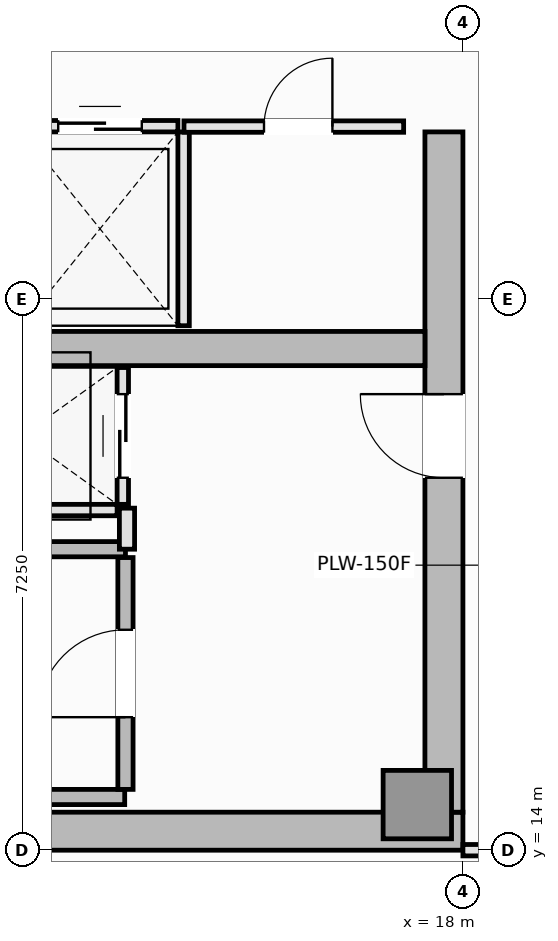
"""IFC4 building model, lengths in metres.
Left out: names, types, materials, properties, quantities, classifications, styles, units other than length and angle.
Written with IfcOpenShell. Run it as: python <this file> out.ifc"""

import sys

from ifc_helpers import new_model, si_unit, direction, frame, frame_2d, origin, origin_2d, place, context, subcontext, project, spatial, rectangle, extrude, element, fill, save


model = new_model("IFC4")
c1 = context("Model", 3, precision=1e-05, world=origin(), true_north=direction((0.0, 1.0)))
c2 = subcontext(c1, "Body", "Model", "MODEL_VIEW")
j1 = project(units=[si_unit("LENGTHUNIT", "METRE"), si_unit("PLANEANGLEUNIT", "RADIAN")], contexts=[c1])
p1 = place(None, origin())
s1 = spatial("IfcSite", under=j1, at=p1, CompositionType="ELEMENT")
p2 = place(p1, origin())
s2 = spatial("IfcBuilding", under=s1, at=p2, CompositionType="ELEMENT")
p3 = place(p2, frame((0.0, 0.0, 281.2)))
s3 = spatial("IfcBuildingStorey", under=s2, at=p3, CompositionType="ELEMENT", Elevation=281.2)
p4 = place(p3, frame((4.5, 14.25, 0.0), z_axis=(0.0, 0.0, 1.0), x_axis=(1.0, 0.0, 0.0)))
e1 = element("IfcWall", 1, at=p4, inside=s3, PredefinedType="SHEAR", context=c2, shape_type="SweptSolid", body=[
    extrude(rectangle(XDim=13.5, YDim=0.5, at=frame_2d((6.75, 0.0))), origin(), (0.0, 0.0, 1.0), 3.55),
])
p5 = place(p3, frame((17.75, 14.5, 0.0), z_axis=(0.0, 0.0, 1.0), x_axis=(0.0, 1.0, 0.0)))
e2 = element("IfcWall", 2, at=p5, inside=s3, PredefinedType="SHEAR", context=c2, shape_type="SweptSolid", body=[
    extrude(rectangle(XDim=8.95, YDim=0.5, at=frame_2d((4.475, 0.0))), origin(), (0.0, 0.0, 1.0), 3.55),
])
p6 = place(p5, frame((4.4, 0.0, 0.0)))
e3 = element("IfcOpeningElement", 3, at=p6, cuts=e2, PredefinedType="OPENING", context=c2, shape_type="SweptSolid", body=[
    extrude(rectangle(XDim=1.1, YDim=2.15, at=frame_2d((0.55, 1.075))), frame((0.0, 0.26, 0.0), z_axis=(0.0, -1.0, 0.0), x_axis=(1.0, 0.0, 0.0)), (0.0, 0.0, 1.0), 0.52),
])
p7 = place(p3, frame((5.0, 20.6, 0.0), z_axis=(0.0, 0.0, 1.0), x_axis=(1.0, 0.0, 0.0)))
e4 = element("IfcWall", 4, at=p7, inside=s3, PredefinedType="SHEAR", context=c2, shape_type="SweptSolid", body=[
    extrude(rectangle(XDim=12.5, YDim=0.45, at=frame_2d((6.25, 0.0))), origin(), (0.0, 0.0, 1.0), 3.55),
])
p8 = place(p3, frame((17.4, 14.6, 0.0), z_axis=(0.0, 0.0, 1.0), x_axis=(1.0, 0.0, 0.0)))
e5 = element("IfcColumn", 5, at=p8, inside=s3, PredefinedType="PILASTER", context=c2, shape_type="SweptSolid", body=[
    extrude(rectangle(XDim=0.9, YDim=0.9, at=origin_2d()), origin(), (0.0, 0.0, 1.0), 3.55),
])
p9 = place(p3, frame((5.8, 14.7, 0.0), z_axis=(0.0, 0.0, 1.0), x_axis=(1.0, 0.0, 0.0)))
e6 = element("IfcWall", 6, at=p9, inside=s3, PredefinedType="SOLIDWALL", context=c2, shape_type="SweptSolid", body=[
    extrude(rectangle(XDim=7.75, YDim=0.2, at=frame_2d((3.875, 0.0))), origin(), (0.0, 0.0, 1.0), 3.55),
])
p10 = place(p3, frame((5.9, 17.96, 0.0), z_axis=(0.0, 0.0, 1.0), x_axis=(1.0, 0.0, 0.0)))
e7 = element("IfcWall", 7, at=p10, inside=s3, PredefinedType="SOLIDWALL", context=c2, shape_type="SweptSolid", body=[
    extrude(rectangle(XDim=7.66, YDim=0.2, at=frame_2d((3.83, 0.0))), origin(), (0.0, 0.0, 1.0), 3.55),
])
p11 = place(p3, frame((13.56, 14.8, 0.0), z_axis=(0.0, 0.0, 1.0), x_axis=(0.0, 1.0, 0.0)))
e8 = element("IfcWall", 8, at=p11, inside=s3, PredefinedType="SOLIDWALL", context=c2, shape_type="SweptSolid", body=[
    extrude(rectangle(XDim=3.05, YDim=0.2, at=frame_2d((1.525, 0.0))), origin(), (0.0, 0.0, 1.0), 3.55),
])
p12 = place(p11, frame((0.95, 0.0, 0.0)))
e9 = element("IfcOpeningElement", 9, at=p12, cuts=e8, PredefinedType="OPENING", context=c2, shape_type="SweptSolid", body=[
    extrude(rectangle(XDim=1.15, YDim=2.15, at=frame_2d((0.575, 1.075))), frame((0.0, 0.11, 0.0), z_axis=(0.0, -1.0, 0.0), x_axis=(1.0, 0.0, 0.0)), (0.0, 0.0, 1.0), 0.22),
])
p13 = place(p3, frame((12.2, 23.525, 0.0), z_axis=(0.0, 0.0, 1.0), x_axis=(1.0, 0.0, 0.0)))
e10 = element("IfcWall", 10, at=p13, inside=s3, PredefinedType="PARTITIONING", context=c2, shape_type="SweptSolid", body=[
    extrude(rectangle(XDim=2.05, YDim=0.15, at=frame_2d((1.025, 0.0))), origin(), (0.0, 0.0, 1.0), 3.39),
])
p14 = place(p13, frame((0.475, 0.0, 0.0)))
e11 = element("IfcOpeningElement", 11, at=p14, cuts=e10, PredefinedType="OPENING", context=c2, shape_type="SweptSolid", body=[
    extrude(rectangle(XDim=1.1, YDim=2.2, at=frame_2d((0.55, 1.1))), frame((0.0, 0.085, 0.0), z_axis=(0.0, -1.0, 0.0), x_axis=(1.0, 0.0, 0.0)), (0.0, 0.0, 1.0), 0.17),
])
p15 = place(p3, frame((14.325, 20.9, 0.0), z_axis=(0.0, 0.0, 1.0), x_axis=(0.0, 1.0, 0.0)))
e12 = element("IfcWall", 12, at=p15, inside=s3, PredefinedType="PARTITIONING", context=c2, shape_type="SweptSolid", body=[
    extrude(rectangle(XDim=2.55, YDim=0.15, at=frame_2d((1.275, 0.0))), origin(), (0.0, 0.0, 1.0), 3.39),
])
p16 = place(p3, frame((10.95, 18.475, 0.0), z_axis=(0.0, 0.0, 1.0), x_axis=(1.0, 0.0, 0.0)))
e13 = element("IfcWall", 13, at=p16, inside=s3, PredefinedType="PARTITIONING", context=c2, shape_type="SweptSolid", body=[
    extrude(rectangle(XDim=2.5, YDim=0.15, at=frame_2d((1.25, 0.0))), origin(), (0.0, 0.0, 1.0), 3.39),
])
p17 = place(p3, frame((13.525, 18.55, 0.0), z_axis=(0.0, 0.0, 1.0), x_axis=(0.0, 1.0, 0.0)))
e14 = element("IfcWall", 14, at=p17, inside=s3, PredefinedType="PARTITIONING", context=c2, shape_type="SweptSolid", body=[
    extrude(rectangle(XDim=1.8, YDim=0.15, at=frame_2d((0.9, 0.0))), origin(), (0.0, 0.0, 1.0), 3.39),
])
p18 = place(p17, frame((0.35, 0.0, 0.0)))
e15 = element("IfcOpeningElement", 15, at=p18, cuts=e14, PredefinedType="OPENING", context=c2, shape_type="SweptSolid", body=[
    extrude(rectangle(XDim=1.1, YDim=2.2, at=frame_2d((0.55, 1.1))), frame((0.0, 0.085, 0.0), z_axis=(0.0, -1.0, 0.0), x_axis=(1.0, 0.0, 0.0)), (0.0, 0.0, 1.0), 0.17),
])
p19 = place(p3, frame((13.58, 17.96, 0.0), z_axis=(0.0, 0.0, 1.0), x_axis=(0.0, 1.0, 0.0)))
e16 = element("IfcWall", 16, at=p19, inside=s3, PredefinedType="PARTITIONING", context=c2, shape_type="SweptSolid", body=[
    extrude(rectangle(XDim=0.54, YDim=0.2, at=frame_2d((0.27, 0.0))), origin(), (0.0, 0.0, 1.0), 3.39),
])
p20 = place(p3, frame((14.33, 23.52, 0.0), z_axis=(0.0, 0.0, 1.0), x_axis=(1.0, 0.0, 0.0)))
e17 = element("IfcWall", 17, at=p20, inside=s3, PredefinedType="PARTITIONING", context=c2, shape_type="SweptSolid", body=[
    extrude(rectangle(XDim=2.89, YDim=0.15, at=frame_2d((1.445, 0.0))), origin(), (0.0, 0.0, 1.0), 3.39),
])
p21 = place(p20, frame((1.053, 0.0, 0.0)))
e18 = element("IfcOpeningElement", 18, at=p21, cuts=e17, PredefinedType="OPENING", context=c2, shape_type="SweptSolid", body=[
    extrude(rectangle(XDim=0.9, YDim=2.1, at=frame_2d((0.45, 1.05))), frame((0.0, 0.085, 0.0), z_axis=(0.0, -1.0, 0.0), x_axis=(1.0, 0.0, 0.0)), (0.0, 0.0, 1.0), 0.17),
])
p22 = place(p3, frame((18.0, 14.0, 0.0), z_axis=(0.0, 0.0, 1.0), x_axis=(1.0, 0.0, 0.0)))
e19 = element("IfcWall", 19, at=p22, inside=s3, PredefinedType="PARTITIONING", context=c2, shape_type="SweptSolid", body=[
    extrude(rectangle(XDim=1.9, YDim=0.15, at=frame_2d((0.95, 0.0))), origin(), (0.0, 0.0, 1.0), 3.39),
])
p23 = place(p22, frame((0.5, 0.0, 0.0)))
e20 = element("IfcOpeningElement", 20, at=p23, cuts=e19, PredefinedType="OPENING", context=c2, shape_type="SweptSolid", body=[
    extrude(rectangle(XDim=0.9, YDim=2.1, at=frame_2d((0.45, 1.05))), frame((0.0, 0.085, 0.0), z_axis=(0.0, -1.0, 0.0), x_axis=(1.0, 0.0, 0.0)), (0.0, 0.0, 1.0), 0.17),
])
p24 = place(p12, origin())
e21 = element("IfcDoor", 21, at=p24, inside=s3, OperationType="SINGLE_SWING_LEFT", PredefinedType="DOOR", context=c2, shape_type="SweptSolid", body=[
    extrude(rectangle(XDim=1.15, YDim=2.15, at=frame_2d((0.575, 1.075))), frame((0.0, 0.025, 0.0), z_axis=(0.0, -1.0, 0.0), x_axis=(1.0, 0.0, 0.0)), (0.0, 0.0, 1.0), 0.05),
])
fill(e9, e21)
p25 = place(p14, origin())
e22 = element("IfcDoor", 22, at=p25, inside=s3, OperationType="DOUBLE_DOOR_SLIDING", PredefinedType="DOOR", context=c2, shape_type="SweptSolid", body=[
    extrude(rectangle(XDim=1.1, YDim=2.2, at=frame_2d((0.55, 1.1))), frame((0.0, 0.025, 0.0), z_axis=(0.0, -1.0, 0.0), x_axis=(1.0, 0.0, 0.0)), (0.0, 0.0, 1.0), 0.05),
])
fill(e11, e22)
p26 = place(p18, origin())
e23 = element("IfcDoor", 23, at=p26, inside=s3, OperationType="DOUBLE_DOOR_SLIDING", PredefinedType="DOOR", context=c2, shape_type="SweptSolid", body=[
    extrude(rectangle(XDim=1.1, YDim=2.2, at=frame_2d((0.55, 1.1))), frame((0.0, 0.025, 0.0), z_axis=(0.0, -1.0, 0.0), x_axis=(1.0, 0.0, 0.0)), (0.0, 0.0, 1.0), 0.05),
])
fill(e15, e23)
p27 = place(p6, origin())
e24 = element("IfcDoor", 24, at=p27, inside=s3, OperationType="SINGLE_SWING_RIGHT", PredefinedType="DOOR", context=c2, shape_type="SweptSolid", body=[
    extrude(rectangle(XDim=1.1, YDim=2.15, at=frame_2d((0.55, 1.075))), frame((0.0, 0.025, 0.0), z_axis=(0.0, -1.0, 0.0), x_axis=(1.0, 0.0, 0.0)), (0.0, 0.0, 1.0), 0.05),
])
fill(e3, e24)
p28 = place(p21, origin())
e25 = element("IfcDoor", 25, at=p28, inside=s3, OperationType="SINGLE_SWING_RIGHT", PredefinedType="DOOR", context=c2, shape_type="SweptSolid", body=[
    extrude(rectangle(XDim=0.9, YDim=2.1, at=frame_2d((0.45, 1.05))), frame((0.0, 0.025, 0.0), z_axis=(0.0, -1.0, 0.0), x_axis=(1.0, 0.0, 0.0)), (0.0, 0.0, 1.0), 0.05),
])
fill(e18, e25)
save(model, sys.argv[1])
